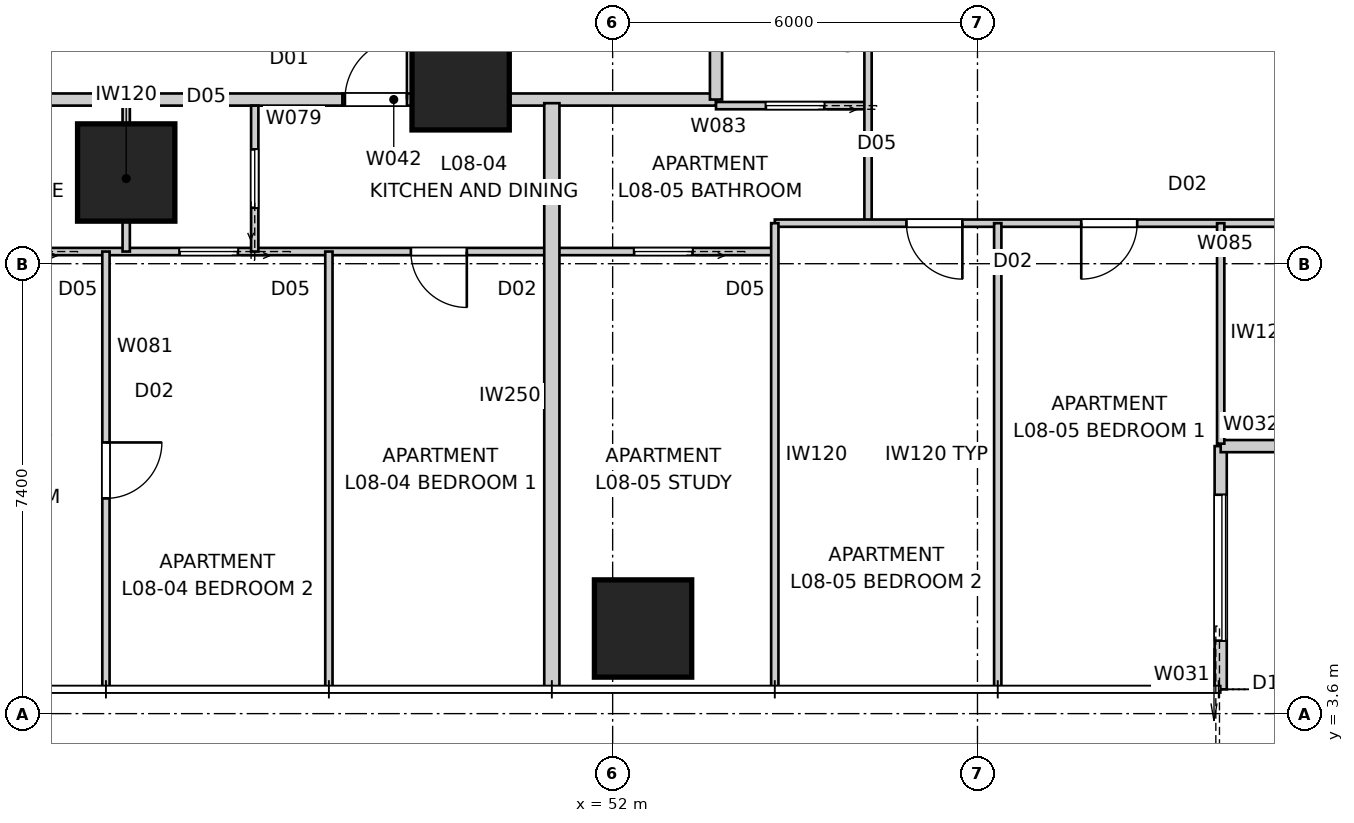
"""IFC4 building model, lengths in metres.
Left out: names, types, materials, properties, quantities, classifications, styles, units other than length and angle.
Written with IfcOpenShell. Run it as: python <this file> out.ifc"""

import sys

from ifc_helpers import new_model, si_unit, direction, frame, frame_2d, origin, origin_2d, place, context, subcontext, project, spatial, rectangle, extrude, element, fill, save


model = new_model("IFC4")
c1 = context("Model", 3, precision=1e-05, world=origin(), true_north=direction((0.0, 1.0)))
c2 = subcontext(c1, "Body", "Model", "MODEL_VIEW")
j1 = project(units=[si_unit("LENGTHUNIT", "METRE"), si_unit("PLANEANGLEUNIT", "RADIAN")], contexts=[c1])
p1 = place(None, origin())
s1 = spatial("IfcSite", under=j1, at=p1, CompositionType="ELEMENT")
p2 = place(p1, origin())
s2 = spatial("IfcBuilding", under=s1, at=p2, CompositionType="ELEMENT")
p3 = place(p2, frame((0.0, 0.0, 32.0)))
s3 = spatial("IfcBuildingStorey", under=s2, at=p3, CompositionType="ELEMENT", Elevation=32.0)
for number, where, z_axis, x_axis in (
    (1, (52.5, 5.0, 0.0), (0.0, 0.0, 1.0), (1.0, 0.0, 0.0)),
    (2, (44.0, 12.5, 0.0), (0.0, 0.0, 1.0), (1.0, 0.0, 0.0)),
    (3, (49.5, 14.0, 0.0), (0.0, 0.0, 1.0), (1.0, 0.0, 0.0)),
):
    element("IfcColumn", number, at=place(p3, frame(where, z_axis=z_axis, x_axis=x_axis)), inside=s3, PredefinedType="COLUMN", context=c2, shape_type="SweptSolid", body=[
        extrude(rectangle(XDim=1.6, YDim=1.6, at=origin_2d()), origin(), (0.0, 0.0, 1.0), 3.4),
    ])
p4 = place(p3, frame((62.0, 4.0, 0.0), z_axis=(0.0, 0.0, 1.0), x_axis=(0.0, 1.0, 0.0)))
e4 = element("IfcWall", 4, at=p4, inside=s3, PredefinedType="SOLIDWALL", context=c2, shape_type="SweptSolid", body=[
    extrude(rectangle(XDim=4.0, YDim=0.2, at=frame_2d((2.0, 0.0))), origin(), (0.0, 0.0, 1.0), 3.25),
])
p5 = place(p4, frame((0.8, 0.0, 0.0)))
e5 = element("IfcOpeningElement", 5, at=p5, cuts=e4, PredefinedType="OPENING", context=c2, shape_type="SweptSolid", body=[
    extrude(rectangle(XDim=2.4, YDim=2.1, at=frame_2d((1.2, 1.05))), frame((0.0, 0.11, 0.0), z_axis=(0.0, -1.0, 0.0), x_axis=(1.0, 0.0, 0.0)), (0.0, 0.0, 1.0), 0.22),
])
p6 = place(p3, frame((62.0, 8.0, 0.0), z_axis=(0.0, 0.0, 1.0), x_axis=(1.0, 0.0, 0.0)))
e6 = element("IfcWall", 6, at=p6, inside=s3, PredefinedType="SOLIDWALL", context=c2, shape_type="SweptSolid", body=[
    extrude(rectangle(XDim=4.0, YDim=0.2, at=frame_2d((2.0, 0.0))), origin(), (0.0, 0.0, 1.0), 3.25),
])
p7 = place(p6, frame((1.0, 0.0, 0.45)))
e7 = element("IfcOpeningElement", 7, at=p7, cuts=e6, PredefinedType="OPENING", context=c2, shape_type="SweptSolid", body=[
    extrude(rectangle(XDim=2.0, YDim=1.8, at=frame_2d((1.0, 0.9))), frame((0.0, 0.11, 0.0), z_axis=(0.0, -1.0, 0.0), x_axis=(1.0, 0.0, 0.0)), (0.0, 0.0, 1.0), 0.22),
])
p8 = place(p3, frame((32.442, 13.7, 0.0), z_axis=(0.0, 0.0, 1.0), x_axis=(1.0, 0.0, 0.0)))
e8 = element("IfcWall", 8, at=p8, inside=s3, PredefinedType="PARTITIONING", context=c2, shape_type="SweptSolid", body=[
    extrude(rectangle(XDim=15.117, YDim=0.2, at=frame_2d((7.558, 0.0))), origin(), (0.0, 0.0, 1.0), 3.25),
])
p9 = place(p3, frame((47.558, 13.7, 0.0), z_axis=(0.0, 0.0, 1.0), x_axis=(1.0, 0.0, 0.0)))
e9 = element("IfcWall", 9, at=p9, inside=s3, PredefinedType="PARTITIONING", context=c2, shape_type="SweptSolid", body=[
    extrude(rectangle(XDim=1.683, YDim=0.2, at=frame_2d((0.842, 0.0))), origin(), (0.0, 0.0, 1.0), 2.55),
])
p10 = place(p9, frame((0.039, 0.0, 0.0)))
e10 = element("IfcOpeningElement", 10, at=p10, cuts=e9, PredefinedType="OPENING", context=c2, shape_type="SweptSolid", body=[
    extrude(rectangle(XDim=1.02, YDim=2.34, at=frame_2d((0.51, 1.17))), frame((0.0, 0.11, 0.0), z_axis=(0.0, -1.0, 0.0), x_axis=(1.0, 0.0, 0.0)), (0.0, 0.0, 1.0), 0.22),
])
p11 = place(p3, frame((49.242, 13.7, 0.0), z_axis=(0.0, 0.0, 1.0), x_axis=(1.0, 0.0, 0.0)))
e11 = element("IfcWall", 11, at=p11, inside=s3, PredefinedType="PARTITIONING", context=c2, shape_type="SweptSolid", body=[
    extrude(rectangle(XDim=4.458, YDim=0.2, at=frame_2d((2.229, 0.0))), origin(), (0.0, 0.0, 1.0), 3.25),
])
p12 = place(p3, frame((53.7, 13.7, 0.0), z_axis=(0.0, 0.0, 1.0), x_axis=(0.0, 1.0, 0.0)))
e12 = element("IfcWall", 12, at=p12, inside=s3, PredefinedType="PARTITIONING", context=c2, shape_type="SweptSolid", body=[
    extrude(rectangle(XDim=32.6, YDim=0.2, at=frame_2d((16.3, 0.0))), origin(), (0.0, 0.0, 1.0), 3.25),
])
p13 = place(p12, frame((2.315, 0.0, 0.0)))
e13 = element("IfcOpeningElement", 13, at=p13, cuts=e12, PredefinedType="OPENING", context=c2, shape_type="SweptSolid", body=[
    extrude(rectangle(XDim=1.02, YDim=2.34, at=frame_2d((0.51, 1.17))), frame((0.0, 0.11, 0.0), z_axis=(0.0, -1.0, 0.0), x_axis=(1.0, 0.0, 0.0)), (0.0, 0.0, 1.0), 0.22),
])
p14 = place(p12, frame((29.265, 0.0, 0.0)))
e14 = element("IfcOpeningElement", 14, at=p14, cuts=e12, PredefinedType="OPENING", context=c2, shape_type="SweptSolid", body=[
    extrude(rectangle(XDim=1.02, YDim=2.34, at=frame_2d((0.51, 1.17))), frame((0.0, 0.11, 0.0), z_axis=(0.0, -1.0, 0.0), x_axis=(1.0, 0.0, 0.0)), (0.0, 0.0, 1.0), 0.22),
])
p15 = place(p12, frame((20.646, 0.0, 0.0)))
e15 = element("IfcOpeningElement", 15, at=p15, cuts=e12, PredefinedType="OPENING", context=c2, shape_type="SweptSolid", body=[
    extrude(rectangle(XDim=1.02, YDim=2.34, at=frame_2d((0.51, 1.17))), frame((0.0, 0.11, 0.0), z_axis=(0.0, -1.0, 0.0), x_axis=(1.0, 0.0, 0.0)), (0.0, 0.0, 1.0), 0.22),
])
p16 = place(p12, frame((13.626, 0.0, 0.0)))
e16 = element("IfcOpeningElement", 16, at=p16, cuts=e12, PredefinedType="OPENING", context=c2, shape_type="SweptSolid", body=[
    extrude(rectangle(XDim=1.02, YDim=2.34, at=frame_2d((0.51, 1.17))), frame((0.0, 0.11, 0.0), z_axis=(0.0, -1.0, 0.0), x_axis=(1.0, 0.0, 0.0)), (0.0, 0.0, 1.0), 0.22),
])
p17 = place(p3, frame((51.0, 4.0, 0.0), z_axis=(0.0, 0.0, 1.0), x_axis=(0.0, 1.0, 0.0)))
e17 = element("IfcWall", 17, at=p17, inside=s3, PredefinedType="PARTITIONING", context=c2, shape_type="SweptSolid", body=[
    extrude(rectangle(XDim=9.64, YDim=0.25, at=frame_2d((4.82, 0.0))), origin(), (0.0, 0.0, 1.0), 3.25),
])
p18 = place(p3, frame((54.667, 11.2, 0.0), z_axis=(0.0, 0.0, 1.0), x_axis=(-1.0, 0.0, 0.0)))
e18 = element("IfcWall", 18, at=p18, inside=s3, PredefinedType="PARTITIONING", context=c2, shape_type="SweptSolid", body=[
    extrude(rectangle(XDim=30.867, YDim=0.12, at=frame_2d((15.433, 0.0))), origin(), (0.0, 0.0, 1.0), 3.25),
])
p19 = place(p18, frame((23.348, 0.0, 0.0)))
e19 = element("IfcOpeningElement", 19, at=p19, cuts=e18, PredefinedType="OPENING", context=c2, shape_type="SweptSolid", body=[
    extrude(rectangle(XDim=0.92, YDim=2.34, at=frame_2d((0.46, 1.17))), frame((0.0, 0.07, 0.0), z_axis=(0.0, -1.0, 0.0), x_axis=(1.0, 0.0, 0.0)), (0.0, 0.0, 1.0), 0.14),
])
p20 = place(p18, frame((20.943, 0.0, 0.0)))
e20 = element("IfcOpeningElement", 20, at=p20, cuts=e18, PredefinedType="OPENING", context=c2, shape_type="SweptSolid", body=[
    extrude(rectangle(XDim=0.92, YDim=2.34, at=frame_2d((0.46, 1.17))), frame((0.0, 0.07, 0.0), z_axis=(0.0, -1.0, 0.0), x_axis=(1.0, 0.0, 0.0)), (0.0, 0.0, 1.0), 0.14),
])
p21 = place(p18, frame((5.065, 0.0, 0.0)))
e21 = element("IfcOpeningElement", 21, at=p21, cuts=e18, PredefinedType="OPENING", context=c2, shape_type="SweptSolid", body=[
    extrude(rectangle(XDim=0.92, YDim=2.34, at=frame_2d((0.46, 1.17))), frame((0.0, 0.07, 0.0), z_axis=(0.0, -1.0, 0.0), x_axis=(1.0, 0.0, 0.0)), (0.0, 0.0, 1.0), 0.14),
])
p22 = place(p18, frame((27.065, 0.0, 0.0)))
e22 = element("IfcOpeningElement", 22, at=p22, cuts=e18, PredefinedType="OPENING", context=c2, shape_type="SweptSolid", body=[
    extrude(rectangle(XDim=0.92, YDim=2.34, at=frame_2d((0.46, 1.17))), frame((0.0, 0.07, 0.0), z_axis=(0.0, -1.0, 0.0), x_axis=(1.0, 0.0, 0.0)), (0.0, 0.0, 1.0), 0.14),
])
p23 = place(p18, frame((1.353, 0.0, 0.0)))
e23 = element("IfcOpeningElement", 23, at=p23, cuts=e18, PredefinedType="OPENING", context=c2, shape_type="SweptSolid", body=[
    extrude(rectangle(XDim=0.96, YDim=2.1, at=frame_2d((0.48, 1.05))), frame((0.0, 0.07, 0.0), z_axis=(0.0, -1.0, 0.0), x_axis=(1.0, 0.0, 0.0)), (0.0, 0.0, 1.0), 0.14),
])
p24 = place(p18, frame((8.83, 0.0, 0.0)))
e24 = element("IfcOpeningElement", 24, at=p24, cuts=e18, PredefinedType="OPENING", context=c2, shape_type="SweptSolid", body=[
    extrude(rectangle(XDim=0.96, YDim=2.1, at=frame_2d((0.48, 1.05))), frame((0.0, 0.07, 0.0), z_axis=(0.0, -1.0, 0.0), x_axis=(1.0, 0.0, 0.0)), (0.0, 0.0, 1.0), 0.14),
])
p25 = place(p18, frame((12.328, 0.0, 0.0)))
e25 = element("IfcOpeningElement", 25, at=p25, cuts=e18, PredefinedType="OPENING", context=c2, shape_type="SweptSolid", body=[
    extrude(rectangle(XDim=0.96, YDim=2.1, at=frame_2d((0.48, 1.05))), frame((0.0, 0.07, 0.0), z_axis=(0.0, -1.0, 0.0), x_axis=(1.0, 0.0, 0.0)), (0.0, 0.0, 1.0), 0.14),
])
p26 = place(p18, frame((15.996, 0.0, 0.0)))
e26 = element("IfcOpeningElement", 26, at=p26, cuts=e18, PredefinedType="OPENING", context=c2, shape_type="SweptSolid", body=[
    extrude(rectangle(XDim=0.96, YDim=2.1, at=frame_2d((0.48, 1.05))), frame((0.0, 0.07, 0.0), z_axis=(0.0, -1.0, 0.0), x_axis=(1.0, 0.0, 0.0)), (0.0, 0.0, 1.0), 0.14),
])
p27 = place(p3, frame((46.114, 11.2, 0.0), z_axis=(0.0, 0.0, 1.0), x_axis=(0.0, 1.0, 0.0)))
e27 = element("IfcWall", 27, at=p27, inside=s3, PredefinedType="PARTITIONING", context=c2, shape_type="SweptSolid", body=[
    extrude(rectangle(XDim=2.4, YDim=0.12, at=frame_2d((1.2, 0.0))), origin(), (0.0, 0.0, 1.0), 3.25),
])
p28 = place(p27, frame((0.72, 0.0, 0.0)))
e28 = element("IfcOpeningElement", 28, at=p28, cuts=e27, PredefinedType="OPENING", context=c2, shape_type="SweptSolid", body=[
    extrude(rectangle(XDim=0.96, YDim=2.1, at=frame_2d((0.48, 1.05))), frame((0.0, 0.07, 0.0), z_axis=(0.0, -1.0, 0.0), x_axis=(1.0, 0.0, 0.0)), (0.0, 0.0, 1.0), 0.14),
])
p29 = place(p3, frame((44.0, 11.2, 0.0), z_axis=(0.0, 0.0, 1.0), x_axis=(0.0, 1.0, 0.0)))
e29 = element("IfcWall", 29, at=p29, inside=s3, PredefinedType="PARTITIONING", context=c2, shape_type="SweptSolid", body=[
    extrude(rectangle(XDim=2.4, YDim=0.12, at=frame_2d((1.2, 0.0))), origin(), (0.0, 0.0, 1.0), 3.25),
])
p30 = place(p3, frame((43.667, 11.2, 0.0), z_axis=(0.0, 0.0, 1.0), x_axis=(0.0, -1.0, 0.0)))
e30 = element("IfcWall", 30, at=p30, inside=s3, PredefinedType="PARTITIONING", context=c2, shape_type="SweptSolid", body=[
    extrude(rectangle(XDim=7.16, YDim=0.12, at=frame_2d((3.58, 0.0))), origin(), (0.0, 0.0, 1.0), 3.25),
])
p31 = place(p30, frame((3.14, 0.0, 0.0)))
e31 = element("IfcOpeningElement", 31, at=p31, cuts=e30, PredefinedType="OPENING", context=c2, shape_type="SweptSolid", body=[
    extrude(rectangle(XDim=0.92, YDim=2.34, at=frame_2d((0.46, 1.17))), frame((0.0, 0.07, 0.0), z_axis=(0.0, -1.0, 0.0), x_axis=(1.0, 0.0, 0.0)), (0.0, 0.0, 1.0), 0.14),
])
p32 = place(p3, frame((47.333, 4.04, 0.0), z_axis=(0.0, 0.0, 1.0), x_axis=(0.0, 1.0, 0.0)))
e32 = element("IfcWall", 32, at=p32, inside=s3, PredefinedType="PARTITIONING", context=c2, shape_type="SweptSolid", body=[
    extrude(rectangle(XDim=7.16, YDim=0.12, at=frame_2d((3.58, 0.0))), origin(), (0.0, 0.0, 1.0), 3.25),
])
p33 = place(p3, frame((56.2, 13.6, 0.0), z_axis=(0.0, 0.0, 1.0), x_axis=(-1.0, 0.0, 0.0)))
e33 = element("IfcWall", 33, at=p33, inside=s3, PredefinedType="PARTITIONING", context=c2, shape_type="SweptSolid", body=[
    extrude(rectangle(XDim=2.5, YDim=0.12, at=frame_2d((1.25, 0.0))), origin(), (0.0, 0.0, 1.0), 3.25),
])
p34 = place(p33, frame((0.72, 0.0, 0.0)))
e34 = element("IfcOpeningElement", 34, at=p34, cuts=e33, PredefinedType="OPENING", context=c2, shape_type="SweptSolid", body=[
    extrude(rectangle(XDim=0.96, YDim=2.1, at=frame_2d((0.48, 1.05))), frame((0.0, 0.07, 0.0), z_axis=(0.0, -1.0, 0.0), x_axis=(1.0, 0.0, 0.0)), (0.0, 0.0, 1.0), 0.14),
])
p35 = place(p3, frame((56.2, 48.333, 0.0), z_axis=(0.0, 0.0, 1.0), x_axis=(0.0, -1.0, 0.0)))
e35 = element("IfcWall", 35, at=p35, inside=s3, PredefinedType="PARTITIONING", context=c2, shape_type="SweptSolid", body=[
    extrude(rectangle(XDim=36.667, YDim=0.12, at=frame_2d((18.333, 0.0))), origin(), (0.0, 0.0, 1.0), 2.55),
])
p36 = place(p35, frame((31.573, 0.0, 0.0)))
e36 = element("IfcOpeningElement", 36, at=p36, cuts=e35, PredefinedType="OPENING", context=c2, shape_type="SweptSolid", body=[
    extrude(rectangle(XDim=0.92, YDim=2.34, at=frame_2d((0.46, 1.17))), frame((0.0, 0.07, 0.0), z_axis=(0.0, -1.0, 0.0), x_axis=(1.0, 0.0, 0.0)), (0.0, 0.0, 1.0), 0.14),
])
p37 = place(p35, frame((3.207, 0.0, 0.0)))
e37 = element("IfcOpeningElement", 37, at=p37, cuts=e35, PredefinedType="OPENING", context=c2, shape_type="SweptSolid", body=[
    extrude(rectangle(XDim=0.92, YDim=2.34, at=frame_2d((0.46, 1.17))), frame((0.0, 0.07, 0.0), z_axis=(0.0, -1.0, 0.0), x_axis=(1.0, 0.0, 0.0)), (0.0, 0.0, 1.0), 0.14),
])
p38 = place(p35, frame((12.542, 0.0, 0.0)))
e38 = element("IfcOpeningElement", 38, at=p38, cuts=e35, PredefinedType="OPENING", context=c2, shape_type="SweptSolid", body=[
    extrude(rectangle(XDim=0.92, YDim=2.34, at=frame_2d((0.46, 1.17))), frame((0.0, 0.07, 0.0), z_axis=(0.0, -1.0, 0.0), x_axis=(1.0, 0.0, 0.0)), (0.0, 0.0, 1.0), 0.14),
])
p39 = place(p35, frame((19.732, 0.0, 0.0)))
e39 = element("IfcOpeningElement", 39, at=p39, cuts=e35, PredefinedType="OPENING", context=c2, shape_type="SweptSolid", body=[
    extrude(rectangle(XDim=0.92, YDim=2.34, at=frame_2d((0.46, 1.17))), frame((0.0, 0.07, 0.0), z_axis=(0.0, -1.0, 0.0), x_axis=(1.0, 0.0, 0.0)), (0.0, 0.0, 1.0), 0.14),
])
p40 = place(p35, frame((9.762, 0.0, 0.0)))
e40 = element("IfcOpeningElement", 40, at=p40, cuts=e35, PredefinedType="OPENING", context=c2, shape_type="SweptSolid", body=[
    extrude(rectangle(XDim=0.96, YDim=2.1, at=frame_2d((0.48, 1.05))), frame((0.0, 0.07, 0.0), z_axis=(0.0, -1.0, 0.0), x_axis=(1.0, 0.0, 0.0)), (0.0, 0.0, 1.0), 0.14),
])
p41 = place(p35, frame((16.52, 0.0, 0.0)))
e41 = element("IfcOpeningElement", 41, at=p41, cuts=e35, PredefinedType="OPENING", context=c2, shape_type="SweptSolid", body=[
    extrude(rectangle(XDim=0.96, YDim=2.1, at=frame_2d((0.48, 1.05))), frame((0.0, 0.07, 0.0), z_axis=(0.0, -1.0, 0.0), x_axis=(1.0, 0.0, 0.0)), (0.0, 0.0, 1.0), 0.14),
])
p42 = place(p35, frame((23.709, 0.0, 0.0)))
e42 = element("IfcOpeningElement", 42, at=p42, cuts=e35, PredefinedType="OPENING", context=c2, shape_type="SweptSolid", body=[
    extrude(rectangle(XDim=0.96, YDim=2.1, at=frame_2d((0.48, 1.05))), frame((0.0, 0.07, 0.0), z_axis=(0.0, -1.0, 0.0), x_axis=(1.0, 0.0, 0.0)), (0.0, 0.0, 1.0), 0.14),
])
p43 = place(p3, frame((65.96, 11.667, 0.0), z_axis=(0.0, 0.0, 1.0), x_axis=(-1.0, 0.0, 0.0)))
e43 = element("IfcWall", 43, at=p43, inside=s3, PredefinedType="PARTITIONING", context=c2, shape_type="SweptSolid", body=[
    extrude(rectangle(XDim=11.293, YDim=0.12, at=frame_2d((5.646, 0.0))), origin(), (0.0, 0.0, 1.0), 3.25),
])
p44 = place(p43, frame((1.525, 0.0, 0.0)))
e44 = element("IfcOpeningElement", 44, at=p44, cuts=e43, PredefinedType="OPENING", context=c2, shape_type="SweptSolid", body=[
    extrude(rectangle(XDim=0.92, YDim=2.34, at=frame_2d((0.46, 1.17))), frame((0.0, 0.07, 0.0), z_axis=(0.0, -1.0, 0.0), x_axis=(1.0, 0.0, 0.0)), (0.0, 0.0, 1.0), 0.14),
])
p45 = place(p43, frame((5.333, 0.0, 0.0)))
e45 = element("IfcOpeningElement", 45, at=p45, cuts=e43, PredefinedType="OPENING", context=c2, shape_type="SweptSolid", body=[
    extrude(rectangle(XDim=0.92, YDim=2.34, at=frame_2d((0.46, 1.17))), frame((0.0, 0.07, 0.0), z_axis=(0.0, -1.0, 0.0), x_axis=(1.0, 0.0, 0.0)), (0.0, 0.0, 1.0), 0.14),
])
p46 = place(p43, frame((8.208, 0.0, 0.0)))
e46 = element("IfcOpeningElement", 46, at=p46, cuts=e43, PredefinedType="OPENING", context=c2, shape_type="SweptSolid", body=[
    extrude(rectangle(XDim=0.92, YDim=2.34, at=frame_2d((0.46, 1.17))), frame((0.0, 0.07, 0.0), z_axis=(0.0, -1.0, 0.0), x_axis=(1.0, 0.0, 0.0)), (0.0, 0.0, 1.0), 0.14),
])
p47 = place(p3, frame((54.667, 11.667, 0.0), z_axis=(0.0, 0.0, 1.0), x_axis=(0.0, -1.0, 0.0)))
e47 = element("IfcWall", 47, at=p47, inside=s3, PredefinedType="PARTITIONING", context=c2, shape_type="SweptSolid", body=[
    extrude(rectangle(XDim=7.627, YDim=0.12, at=frame_2d((3.813, 0.0))), origin(), (0.0, 0.0, 1.0), 2.638),
])
p48 = place(p3, frame((58.333, 4.04, 0.0), z_axis=(0.0, 0.0, 1.0), x_axis=(0.0, 1.0, 0.0)))
e48 = element("IfcWall", 48, at=p48, inside=s3, PredefinedType="PARTITIONING", context=c2, shape_type="SweptSolid", body=[
    extrude(rectangle(XDim=7.627, YDim=0.12, at=frame_2d((3.813, 0.0))), origin(), (0.0, 0.0, 1.0), 3.25),
])
p49 = place(p3, frame((62.0, 11.667, 0.0), z_axis=(0.0, 0.0, 1.0), x_axis=(0.0, -1.0, 0.0)))
e49 = element("IfcWall", 49, at=p49, inside=s3, PredefinedType="PARTITIONING", context=c2, shape_type="SweptSolid", body=[
    extrude(rectangle(XDim=3.627, YDim=0.12, at=frame_2d((1.813, 0.0))), origin(), (0.0, 0.0, 1.0), 3.25),
])
p50 = place(p5, origin())
e50 = element("IfcDoor", 50, at=p50, inside=s3, OperationType="SLIDING_TO_LEFT", PredefinedType="DOOR", context=c2, shape_type="SweptSolid", body=[
    extrude(rectangle(XDim=2.4, YDim=2.1, at=frame_2d((1.2, 1.05))), frame((0.0, 0.025, 0.0), z_axis=(0.0, -1.0, 0.0), x_axis=(1.0, 0.0, 0.0)), (0.0, 0.0, 1.0), 0.05),
])
fill(e5, e50)
p51 = place(p10, origin())
e51 = element("IfcDoor", 51, at=p51, inside=s3, OperationType="SINGLE_SWING_RIGHT", PredefinedType="DOOR", context=c2, shape_type="SweptSolid", body=[
    extrude(rectangle(XDim=1.02, YDim=2.34, at=frame_2d((0.51, 1.17))), frame((0.0, 0.025, 0.0), z_axis=(0.0, -1.0, 0.0), x_axis=(1.0, 0.0, 0.0)), (0.0, 0.0, 1.0), 0.05),
])
fill(e10, e51)
p52 = place(p34, origin())
e52 = element("IfcDoor", 52, at=p52, inside=s3, OperationType="SLIDING_TO_LEFT", PredefinedType="DOOR", context=c2, shape_type="SweptSolid", body=[
    extrude(rectangle(XDim=0.96, YDim=2.1, at=frame_2d((0.48, 1.05))), frame((0.0, 0.025, 0.0), z_axis=(0.0, -1.0, 0.0), x_axis=(1.0, 0.0, 0.0)), (0.0, 0.0, 1.0), 0.05),
])
fill(e34, e52)
p53 = place(p21, origin())
e53 = element("IfcDoor", 53, at=p53, inside=s3, OperationType="SINGLE_SWING_LEFT", PredefinedType="DOOR", context=c2, shape_type="SweptSolid", body=[
    extrude(rectangle(XDim=0.92, YDim=2.34, at=frame_2d((0.46, 1.17))), frame((0.0, 0.025, 0.0), z_axis=(0.0, -1.0, 0.0), x_axis=(1.0, 0.0, 0.0)), (0.0, 0.0, 1.0), 0.05),
])
fill(e21, e53)
p54 = place(p28, origin())
e54 = element("IfcDoor", 54, at=p54, inside=s3, OperationType="SLIDING_TO_LEFT", PredefinedType="DOOR", context=c2, shape_type="SweptSolid", body=[
    extrude(rectangle(XDim=0.96, YDim=2.1, at=frame_2d((0.48, 1.05))), frame((0.0, 0.025, 0.0), z_axis=(0.0, -1.0, 0.0), x_axis=(1.0, 0.0, 0.0)), (0.0, 0.0, 1.0), 0.05),
])
fill(e28, e54)
p55 = place(p45, origin())
e55 = element("IfcDoor", 55, at=p55, inside=s3, OperationType="SINGLE_SWING_RIGHT", PredefinedType="DOOR", context=c2, shape_type="SweptSolid", body=[
    extrude(rectangle(XDim=0.92, YDim=2.34, at=frame_2d((0.46, 1.17))), frame((0.0, 0.025, 0.0), z_axis=(0.0, -1.0, 0.0), x_axis=(1.0, 0.0, 0.0)), (0.0, 0.0, 1.0), 0.05),
])
fill(e45, e55)
p56 = place(p46, origin())
e56 = element("IfcDoor", 56, at=p56, inside=s3, OperationType="SINGLE_SWING_LEFT", PredefinedType="DOOR", context=c2, shape_type="SweptSolid", body=[
    extrude(rectangle(XDim=0.92, YDim=2.34, at=frame_2d((0.46, 1.17))), frame((0.0, 0.025, 0.0), z_axis=(0.0, -1.0, 0.0), x_axis=(1.0, 0.0, 0.0)), (0.0, 0.0, 1.0), 0.05),
])
fill(e46, e56)
p57 = place(p23, origin())
e57 = element("IfcDoor", 57, at=p57, inside=s3, OperationType="SLIDING_TO_LEFT", PredefinedType="DOOR", context=c2, shape_type="SweptSolid", body=[
    extrude(rectangle(XDim=0.96, YDim=2.1, at=frame_2d((0.48, 1.05))), frame((0.0, 0.025, 0.0), z_axis=(0.0, -1.0, 0.0), x_axis=(1.0, 0.0, 0.0)), (0.0, 0.0, 1.0), 0.05),
])
fill(e23, e57)
p58 = place(p24, origin())
e58 = element("IfcDoor", 58, at=p58, inside=s3, OperationType="SLIDING_TO_LEFT", PredefinedType="DOOR", context=c2, shape_type="SweptSolid", body=[
    extrude(rectangle(XDim=0.96, YDim=2.1, at=frame_2d((0.48, 1.05))), frame((0.0, 0.025, 0.0), z_axis=(0.0, -1.0, 0.0), x_axis=(1.0, 0.0, 0.0)), (0.0, 0.0, 1.0), 0.05),
])
fill(e24, e58)
p59 = place(p31, origin())
e59 = element("IfcDoor", 59, at=p59, inside=s3, OperationType="SINGLE_SWING_LEFT", PredefinedType="DOOR", context=c2, shape_type="SweptSolid", body=[
    extrude(rectangle(XDim=0.92, YDim=2.34, at=frame_2d((0.46, 1.17))), frame((0.0, 0.025, 0.0), z_axis=(0.0, -1.0, 0.0), x_axis=(1.0, 0.0, 0.0)), (0.0, 0.0, 1.0), 0.05),
])
fill(e31, e59)
save(model, sys.argv[1])
